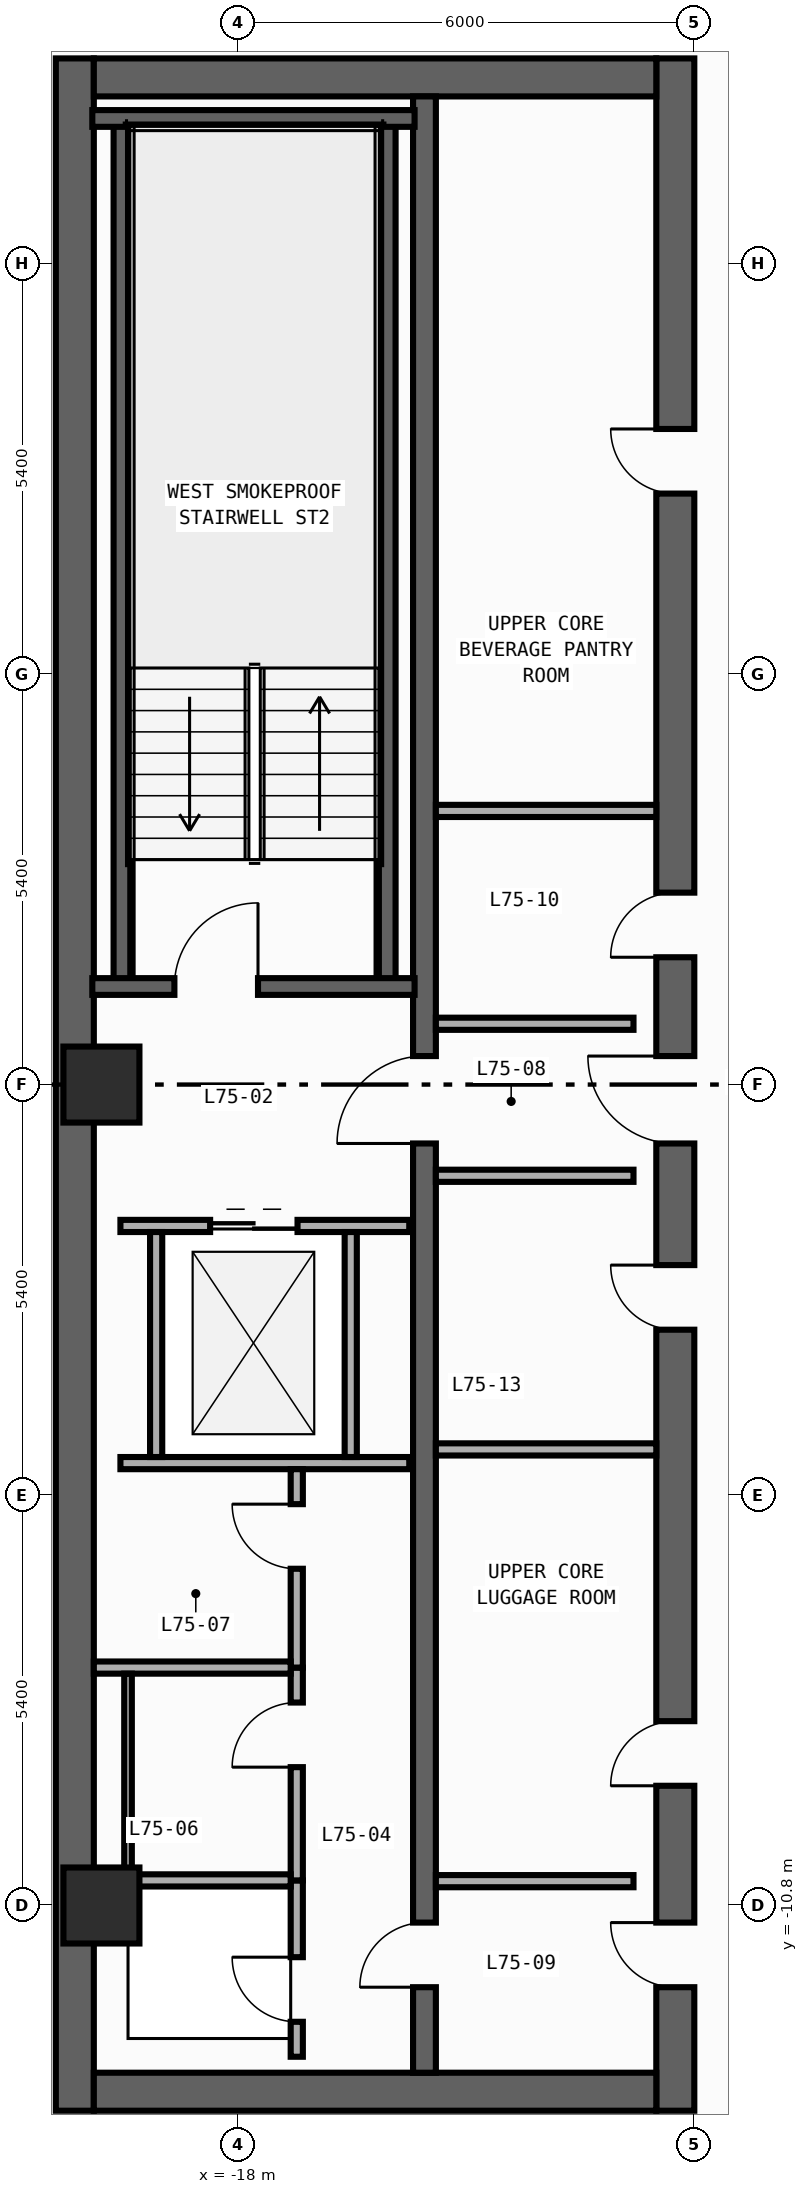
"""IFC4 building model, lengths in metres.
Left out: names, types, materials, properties, quantities, classifications, styles, units other than length and angle.
Written with IfcOpenShell. Run it as: python <this file> out.ifc"""

import sys

from ifc_helpers import new_model, si_unit, direction, frame, frame_2d, origin, origin_2d, place, context, subcontext, project, spatial, rectangle, circle, extrude, element, fill, save


model = new_model("IFC4")
c1 = context("Model", 3, precision=1e-05, world=origin(), true_north=direction((0.0, 1.0)))
c2 = subcontext(c1, "Body", "Model", "MODEL_VIEW")
j1 = project(units=[si_unit("LENGTHUNIT", "METRE"), si_unit("PLANEANGLEUNIT", "RADIAN")], contexts=[c1])
p1 = place(None, origin())
s1 = spatial("IfcSite", under=j1, at=p1, CompositionType="ELEMENT")
p2 = place(p1, origin())
s2 = spatial("IfcBuilding", under=s1, at=p2, CompositionType="ELEMENT")
p3 = place(p2, frame((0.0, 0.0, 311.8)))
s3 = spatial("IfcBuildingStorey", under=s2, at=p3, CompositionType="ELEMENT", Elevation=311.8)
p4 = place(p3, frame((-20.15, -13.5, 0.0), z_axis=(0.0, 0.0, 1.0), x_axis=(0.0, 1.0, 0.0)))
e1 = element("IfcWall", 1, at=p4, inside=s3, PredefinedType="SHEAR", context=c2, shape_type="SweptSolid", body=[
    extrude(rectangle(XDim=27.0, YDim=0.5, at=frame_2d((13.5, 0.0))), origin(), (0.0, 0.0, 1.0), 3.54),
])
p5 = place(p3, frame((-12.25, -13.5, 0.0), z_axis=(0.0, 0.0, 1.0), x_axis=(0.0, 1.0, 0.0)))
e2 = element("IfcWall", 2, at=p5, inside=s3, PredefinedType="SHEAR", context=c2, shape_type="SweptSolid", body=[
    extrude(rectangle(XDim=27.0, YDim=0.5, at=frame_2d((13.5, 0.0))), origin(), (0.0, 0.0, 1.0), 3.54),
])
p6 = place(p5, frame((15.175, 0.0, 0.0)))
e3 = element("IfcOpeningElement", 3, at=p6, cuts=e2, PredefinedType="OPENING", context=c2, shape_type="SweptSolid", body=[
    extrude(rectangle(XDim=0.85, YDim=2.1, at=frame_2d((0.425, 1.05))), frame((0.0, 0.26, 0.0), z_axis=(0.0, -1.0, 0.0), x_axis=(1.0, 0.0, 0.0)), (0.0, 0.0, 1.0), 0.52),
])
p7 = place(p5, frame((21.275, 0.0, 0.0)))
e4 = element("IfcOpeningElement", 4, at=p7, cuts=e2, PredefinedType="OPENING", context=c2, shape_type="SweptSolid", body=[
    extrude(rectangle(XDim=0.85, YDim=2.1, at=frame_2d((0.425, 1.05))), frame((0.0, 0.26, 0.0), z_axis=(0.0, -1.0, 0.0), x_axis=(1.0, 0.0, 0.0)), (0.0, 0.0, 1.0), 0.52),
])
p8 = place(p5, frame((4.275, 0.0, 0.0)))
e5 = element("IfcOpeningElement", 5, at=p8, cuts=e2, PredefinedType="OPENING", context=c2, shape_type="SweptSolid", body=[
    extrude(rectangle(XDim=0.85, YDim=2.1, at=frame_2d((0.425, 1.05))), frame((0.0, 0.26, 0.0), z_axis=(0.0, -1.0, 0.0), x_axis=(1.0, 0.0, 0.0)), (0.0, 0.0, 1.0), 0.52),
])
p9 = place(p5, frame((10.275, 0.0, 0.0)))
e6 = element("IfcOpeningElement", 6, at=p9, cuts=e2, PredefinedType="OPENING", context=c2, shape_type="SweptSolid", body=[
    extrude(rectangle(XDim=0.85, YDim=2.1, at=frame_2d((0.425, 1.05))), frame((0.0, 0.26, 0.0), z_axis=(0.0, -1.0, 0.0), x_axis=(1.0, 0.0, 0.0)), (0.0, 0.0, 1.0), 0.52),
])
p10 = place(p5, frame((12.725, 0.0, 0.0)))
e7 = element("IfcOpeningElement", 7, at=p10, cuts=e2, PredefinedType="OPENING", context=c2, shape_type="SweptSolid", body=[
    extrude(rectangle(XDim=1.15, YDim=2.2, at=frame_2d((0.575, 1.1))), frame((0.0, 0.26, 0.0), z_axis=(0.0, -1.0, 0.0), x_axis=(1.0, 0.0, 0.0)), (0.0, 0.0, 1.0), 0.52),
])
p11 = place(p5, frame((1.625, 0.0, 0.0)))
e8 = element("IfcOpeningElement", 8, at=p11, cuts=e2, PredefinedType="OPENING", context=c2, shape_type="SweptSolid", body=[
    extrude(rectangle(XDim=0.85, YDim=2.1, at=frame_2d((0.425, 1.05))), frame((0.0, 0.26, 0.0), z_axis=(0.0, -1.0, 0.0), x_axis=(1.0, 0.0, 0.0)), (0.0, 0.0, 1.0), 0.52),
])
for number, where, z_axis, x_axis in (
    (9, (-19.9, -13.25, 0.0), (0.0, 0.0, 1.0), (1.0, 0.0, 0.0)),
    (10, (-19.9, 13.25, 0.0), (0.0, 0.0, 1.0), (1.0, 0.0, 0.0)),
):
    element("IfcWall", number, at=place(p3, frame(where, z_axis=z_axis, x_axis=x_axis)), inside=s3, PredefinedType="SHEAR", context=c2, shape_type="SweptSolid", body=[
        extrude(rectangle(XDim=7.4, YDim=0.5, at=frame_2d((3.7, 0.0))), origin(), (0.0, 0.0, 1.0), 3.54),
    ])
p12 = place(p3, frame((-15.55, -13.0, 0.0), z_axis=(0.0, 0.0, 1.0), x_axis=(0.0, 1.0, 0.0)))
e11 = element("IfcWall", 11, at=p12, inside=s3, PredefinedType="SHEAR", context=c2, shape_type="SweptSolid", body=[
    extrude(rectangle(XDim=26.0, YDim=0.3, at=frame_2d((13.0, 0.0))), origin(), (0.0, 0.0, 1.0), 3.54),
])
p13 = place(p12, frame((12.225, 0.0, 0.0)))
e12 = element("IfcOpeningElement", 12, at=p13, cuts=e11, PredefinedType="OPENING", context=c2, shape_type="SweptSolid", body=[
    extrude(rectangle(XDim=1.15, YDim=2.2, at=frame_2d((0.575, 1.1))), frame((0.0, 0.16, 0.0), z_axis=(0.0, -1.0, 0.0), x_axis=(1.0, 0.0, 0.0)), (0.0, 0.0, 1.0), 0.32),
])
p14 = place(p12, frame((1.125, 0.0, 0.0)))
e13 = element("IfcOpeningElement", 13, at=p14, cuts=e11, PredefinedType="OPENING", context=c2, shape_type="SweptSolid", body=[
    extrude(rectangle(XDim=0.85, YDim=2.1, at=frame_2d((0.425, 1.05))), frame((0.0, 0.16, 0.0), z_axis=(0.0, -1.0, 0.0), x_axis=(1.0, 0.0, 0.0)), (0.0, 0.0, 1.0), 0.32),
])
for number, where, z_axis, x_axis in (
    (14, (-16.04, 1.29, 0.0), (0.0, 0.0, 1.0), (0.0, 1.0, 0.0)),
    (15, (-19.53, 1.29, 0.0), (0.0, 0.0, 1.0), (0.0, 1.0, 0.0)),
):
    element("IfcWall", number, at=place(p3, frame(where, z_axis=z_axis, x_axis=x_axis)), inside=s3, PredefinedType="SHEAR", context=c2, shape_type="SweptSolid", body=[
        extrude(rectangle(XDim=11.42, YDim=0.22, at=frame_2d((5.71, 0.0))), origin(), (0.0, 0.0, 1.0), 3.54),
    ])
p15 = place(p3, frame((-19.92, 12.71, 0.0), z_axis=(0.0, 0.0, 1.0), x_axis=(1.0, 0.0, 0.0)))
e16 = element("IfcWall", 16, at=p15, inside=s3, PredefinedType="SHEAR", context=c2, shape_type="SweptSolid", body=[
    extrude(rectangle(XDim=4.24, YDim=0.22, at=frame_2d((2.12, 0.0))), origin(), (0.0, 0.0, 1.0), 3.54),
])
p16 = place(p3, frame((-19.92, 1.29, 0.0), z_axis=(0.0, 0.0, 1.0), x_axis=(1.0, 0.0, 0.0)))
e17 = element("IfcWall", 17, at=p16, inside=s3, PredefinedType="SHEAR", context=c2, shape_type="SweptSolid", body=[
    extrude(rectangle(XDim=4.24, YDim=0.22, at=frame_2d((2.12, 0.0))), origin(), (0.0, 0.0, 1.0), 3.54),
])
p17 = place(p16, frame((1.08, 0.0, 0.0)))
e18 = element("IfcOpeningElement", 18, at=p17, cuts=e17, PredefinedType="OPENING", context=c2, shape_type="SweptSolid", body=[
    extrude(rectangle(XDim=1.1, YDim=2.2, at=frame_2d((0.55, 1.1))), frame((0.0, 0.12, 0.0), z_axis=(0.0, -1.0, 0.0), x_axis=(1.0, 0.0, 0.0)), (0.0, 0.0, 1.0), 0.24),
])
for number, where, z_axis, x_axis in (
    (19, (-19.8, -10.8, 0.0), (0.0, 0.0, 1.0), (1.0, 0.0, 0.0)),
    (20, (-19.8, 0.0, 0.0), (0.0, 0.0, 1.0), (1.0, 0.0, 0.0)),
):
    element("IfcColumn", number, at=place(p3, frame(where, z_axis=z_axis, x_axis=x_axis)), inside=s3, PredefinedType="COLUMN", context=c2, shape_type="SweptSolid", body=[
        extrude(circle(Radius=0.5, at=origin_2d()), origin(), (0.0, 0.0, 1.0), 3.8),
    ])
p18 = place(p3, frame((-19.55, -1.86, 0.0), z_axis=(0.0, 0.0, 1.0), x_axis=(1.0, 0.0, 0.0)))
e21 = element("IfcWall", 21, at=p18, inside=s3, PredefinedType="STANDARD", context=c2, shape_type="SweptSolid", body=[
    extrude(rectangle(XDim=3.8, YDim=0.16, at=frame_2d((1.9, 0.0))), origin(), (0.0, 0.0, 1.0), 3.54),
])
p19 = place(p18, frame((1.18, 0.0, 0.0)))
e22 = element("IfcOpeningElement", 22, at=p19, cuts=e21, PredefinedType="OPENING", context=c2, shape_type="SweptSolid", body=[
    extrude(rectangle(XDim=1.15, YDim=2.2, at=frame_2d((0.575, 1.1))), frame((0.0, 0.09, 0.0), z_axis=(0.0, -1.0, 0.0), x_axis=(1.0, 0.0, 0.0)), (0.0, 0.0, 1.0), 0.18),
])
p20 = place(p3, frame((-19.55, -4.98, 0.0), z_axis=(0.0, 0.0, 1.0), x_axis=(1.0, 0.0, 0.0)))
e23 = element("IfcWall", 23, at=p20, inside=s3, PredefinedType="STANDARD", context=c2, shape_type="SweptSolid", body=[
    extrude(rectangle(XDim=3.8, YDim=0.16, at=frame_2d((1.9, 0.0))), origin(), (0.0, 0.0, 1.0), 3.54),
])
for number, where, z_axis, x_axis in (
    (24, (-19.08, -4.9, 0.0), (0.0, 0.0, 1.0), (0.0, 1.0, 0.0)),
    (25, (-16.52, -4.9, 0.0), (0.0, 0.0, 1.0), (0.0, 1.0, 0.0)),
):
    element("IfcWall", number, at=place(p3, frame(where, z_axis=z_axis, x_axis=x_axis)), inside=s3, PredefinedType="STANDARD", context=c2, shape_type="SweptSolid", body=[
        extrude(rectangle(XDim=2.96, YDim=0.16, at=frame_2d((1.48, 0.0))), origin(), (0.0, 0.0, 1.0), 3.54),
    ])
for number, where, z_axis, x_axis in (
    (26, (-15.4, 0.8, 0.0), (0.0, 0.0, 1.0), (1.0, 0.0, 0.0)),
    (27, (-15.4, -1.2, 0.0), (0.0, 0.0, 1.0), (1.0, 0.0, 0.0)),
    (28, (-15.4, -10.48, 0.0), (0.0, 0.0, 1.0), (1.0, 0.0, 0.0)),
):
    element("IfcWall", number, at=place(p3, frame(where, z_axis=z_axis, x_axis=x_axis)), inside=s3, PredefinedType="STANDARD", context=c2, shape_type="SweptSolid", body=[
        extrude(rectangle(XDim=2.6, YDim=0.16, at=frame_2d((1.3, 0.0))), origin(), (0.0, 0.0, 1.0), 3.54),
    ])
p21 = place(p3, frame((-17.23, -12.79, 0.0), z_axis=(0.0, 0.0, 1.0), x_axis=(0.0, 1.0, 0.0)))
e29 = element("IfcWall", 29, at=p21, inside=s3, PredefinedType="PARTITIONING", context=c2, shape_type="SweptSolid", body=[
    extrude(rectangle(XDim=2.32, YDim=0.16, at=frame_2d((1.16, 0.0))), origin(), (0.0, 0.0, 1.0), 3.54),
])
p22 = place(p21, frame((0.46, 0.0, 0.0)))
e30 = element("IfcOpeningElement", 30, at=p22, cuts=e29, PredefinedType="OPENING", context=c2, shape_type="SweptSolid", body=[
    extrude(rectangle(XDim=0.85, YDim=2.1, at=frame_2d((0.425, 1.05))), frame((0.0, 0.09, 0.0), z_axis=(0.0, -1.0, 0.0), x_axis=(1.0, 0.0, 0.0)), (0.0, 0.0, 1.0), 0.18),
])
p23 = place(p3, frame((-17.23, -10.47, 0.0), z_axis=(0.0, 0.0, 1.0), x_axis=(0.0, 1.0, 0.0)))
e31 = element("IfcWall", 31, at=p23, inside=s3, PredefinedType="PARTITIONING", context=c2, shape_type="SweptSolid", body=[
    extrude(rectangle(XDim=2.8, YDim=0.16, at=frame_2d((1.4, 0.0))), origin(), (0.0, 0.0, 1.0), 3.54),
])
p24 = place(p23, frame((1.49, 0.0, 0.0)))
e32 = element("IfcOpeningElement", 32, at=p24, cuts=e31, PredefinedType="OPENING", context=c2, shape_type="SweptSolid", body=[
    extrude(rectangle(XDim=0.85, YDim=2.1, at=frame_2d((0.425, 1.05))), frame((0.0, 0.09, 0.0), z_axis=(0.0, -1.0, 0.0), x_axis=(1.0, 0.0, 0.0)), (0.0, 0.0, 1.0), 0.18),
])
p25 = place(p3, frame((-17.23, -7.67, 0.0), z_axis=(0.0, 0.0, 1.0), x_axis=(0.0, 1.0, 0.0)))
e33 = element("IfcWall", 33, at=p25, inside=s3, PredefinedType="PARTITIONING", context=c2, shape_type="SweptSolid", body=[
    extrude(rectangle(XDim=2.61, YDim=0.16, at=frame_2d((1.305, 0.0))), origin(), (0.0, 0.0, 1.0), 3.54),
])
p26 = place(p25, frame((1.3, 0.0, 0.0)))
e34 = element("IfcOpeningElement", 34, at=p26, cuts=e33, PredefinedType="OPENING", context=c2, shape_type="SweptSolid", body=[
    extrude(rectangle(XDim=0.85, YDim=2.1, at=frame_2d((0.425, 1.05))), frame((0.0, 0.09, 0.0), z_axis=(0.0, -1.0, 0.0), x_axis=(1.0, 0.0, 0.0)), (0.0, 0.0, 1.0), 0.18),
])
p27 = place(p3, frame((-19.75, -10.47, 0.0), z_axis=(0.0, 0.0, 1.0), x_axis=(1.0, 0.0, 0.0)))
e35 = element("IfcWall", 35, at=p27, inside=s3, PredefinedType="PARTITIONING", context=c2, shape_type="SweptSolid", body=[
    extrude(rectangle(XDim=2.44, YDim=0.16, at=frame_2d((1.22, 0.0))), origin(), (0.0, 0.0, 1.0), 3.54),
])
p28 = place(p3, frame((-19.9, -7.67, 0.0), z_axis=(0.0, 0.0, 1.0), x_axis=(1.0, 0.0, 0.0)))
e36 = element("IfcWall", 36, at=p28, inside=s3, PredefinedType="PARTITIONING", context=c2, shape_type="SweptSolid", body=[
    extrude(rectangle(XDim=2.59, YDim=0.16, at=frame_2d((1.295, 0.0))), origin(), (0.0, 0.0, 1.0), 3.54),
])
for number, where, z_axis, x_axis in (
    (37, (-15.4, 3.6, 0.0), (0.0, 0.0, 1.0), (1.0, 0.0, 0.0)),
    (38, (-15.4, -4.8, 0.0), (0.0, 0.0, 1.0), (1.0, 0.0, 0.0)),
):
    element("IfcWall", number, at=place(p3, frame(where, z_axis=z_axis, x_axis=x_axis)), inside=s3, PredefinedType="PARTITIONING", context=c2, shape_type="SweptSolid", body=[
        extrude(rectangle(XDim=2.9, YDim=0.16, at=frame_2d((1.45, 0.0))), origin(), (0.0, 0.0, 1.0), 3.54),
    ])
p29 = place(p3, frame((-19.45, -10.39, 0.0), z_axis=(0.0, 0.0, 1.0), x_axis=(0.0, 1.0, 0.0)))
e39 = element("IfcWall", 39, at=p29, inside=s3, PredefinedType="PARTITIONING", context=c2, shape_type="SweptSolid", body=[
    extrude(rectangle(XDim=2.64, YDim=0.1, at=frame_2d((1.32, 0.0))), origin(), (0.0, 0.0, 1.0), 3.54),
])
p30 = place(p17, origin())
e40 = element("IfcDoor", 40, at=p30, inside=s3, OperationType="SINGLE_SWING_RIGHT", PredefinedType="DOOR", context=c2, shape_type="SweptSolid", body=[
    extrude(rectangle(XDim=1.1, YDim=2.2, at=frame_2d((0.55, 1.1))), frame((0.0, 0.025, 0.0), z_axis=(0.0, -1.0, 0.0), x_axis=(1.0, 0.0, 0.0)), (0.0, 0.0, 1.0), 0.05),
])
fill(e18, e40)
p31 = place(p6, origin())
e41 = element("IfcDoor", 41, at=p31, inside=s3, OperationType="SINGLE_SWING_LEFT", PredefinedType="DOOR", context=c2, shape_type="SweptSolid", body=[
    extrude(rectangle(XDim=0.85, YDim=2.1, at=frame_2d((0.425, 1.05))), frame((0.0, 0.025, 0.0), z_axis=(0.0, -1.0, 0.0), x_axis=(1.0, 0.0, 0.0)), (0.0, 0.0, 1.0), 0.05),
])
fill(e3, e41)
p32 = place(p7, origin())
e42 = element("IfcDoor", 42, at=p32, inside=s3, OperationType="SINGLE_SWING_RIGHT", PredefinedType="DOOR", context=c2, shape_type="SweptSolid", body=[
    extrude(rectangle(XDim=0.85, YDim=2.1, at=frame_2d((0.425, 1.05))), frame((0.0, 0.025, 0.0), z_axis=(0.0, -1.0, 0.0), x_axis=(1.0, 0.0, 0.0)), (0.0, 0.0, 1.0), 0.05),
])
fill(e4, e42)
p33 = place(p8, origin())
e43 = element("IfcDoor", 43, at=p33, inside=s3, OperationType="SINGLE_SWING_LEFT", PredefinedType="DOOR", context=c2, shape_type="SweptSolid", body=[
    extrude(rectangle(XDim=0.85, YDim=2.1, at=frame_2d((0.425, 1.05))), frame((0.0, 0.025, 0.0), z_axis=(0.0, -1.0, 0.0), x_axis=(1.0, 0.0, 0.0)), (0.0, 0.0, 1.0), 0.05),
])
fill(e5, e43)
p34 = place(p9, origin())
e44 = element("IfcDoor", 44, at=p34, inside=s3, OperationType="SINGLE_SWING_RIGHT", PredefinedType="DOOR", context=c2, shape_type="SweptSolid", body=[
    extrude(rectangle(XDim=0.85, YDim=2.1, at=frame_2d((0.425, 1.05))), frame((0.0, 0.025, 0.0), z_axis=(0.0, -1.0, 0.0), x_axis=(1.0, 0.0, 0.0)), (0.0, 0.0, 1.0), 0.05),
])
fill(e6, e44)
p35 = place(p10, origin())
e45 = element("IfcDoor", 45, at=p35, inside=s3, OperationType="SINGLE_SWING_RIGHT", PredefinedType="DOOR", context=c2, shape_type="SweptSolid", body=[
    extrude(rectangle(XDim=1.15, YDim=2.2, at=frame_2d((0.575, 1.1))), frame((0.0, 0.025, 0.0), z_axis=(0.0, -1.0, 0.0), x_axis=(1.0, 0.0, 0.0)), (0.0, 0.0, 1.0), 0.05),
])
fill(e7, e45)
p36 = place(p13, origin())
e46 = element("IfcDoor", 46, at=p36, inside=s3, OperationType="SINGLE_SWING_LEFT", PredefinedType="DOOR", context=c2, shape_type="SweptSolid", body=[
    extrude(rectangle(XDim=1.15, YDim=2.2, at=frame_2d((0.575, 1.1))), frame((0.0, 0.025, 0.0), z_axis=(0.0, -1.0, 0.0), x_axis=(1.0, 0.0, 0.0)), (0.0, 0.0, 1.0), 0.05),
])
fill(e12, e46)
p37 = place(p11, origin())
e47 = element("IfcDoor", 47, at=p37, inside=s3, OperationType="SINGLE_SWING_RIGHT", PredefinedType="DOOR", context=c2, shape_type="SweptSolid", body=[
    extrude(rectangle(XDim=0.85, YDim=2.1, at=frame_2d((0.425, 1.05))), frame((0.0, 0.025, 0.0), z_axis=(0.0, -1.0, 0.0), x_axis=(1.0, 0.0, 0.0)), (0.0, 0.0, 1.0), 0.05),
])
fill(e8, e47)
p38 = place(p14, origin())
e48 = element("IfcDoor", 48, at=p38, inside=s3, OperationType="SINGLE_SWING_LEFT", PredefinedType="DOOR", context=c2, shape_type="SweptSolid", body=[
    extrude(rectangle(XDim=0.85, YDim=2.1, at=frame_2d((0.425, 1.05))), frame((0.0, 0.025, 0.0), z_axis=(0.0, -1.0, 0.0), x_axis=(1.0, 0.0, 0.0)), (0.0, 0.0, 1.0), 0.05),
])
fill(e13, e48)
p39 = place(p19, origin())
e49 = element("IfcDoor", 49, at=p39, inside=s3, OperationType="DOUBLE_DOOR_SLIDING", PredefinedType="DOOR", context=c2, shape_type="SweptSolid", body=[
    extrude(rectangle(XDim=1.15, YDim=2.2, at=frame_2d((0.575, 1.1))), frame((0.0, 0.025, 0.0), z_axis=(0.0, -1.0, 0.0), x_axis=(1.0, 0.0, 0.0)), (0.0, 0.0, 1.0), 0.05),
])
fill(e22, e49)
p40 = place(p22, origin())
e50 = element("IfcDoor", 50, at=p40, inside=s3, OperationType="SINGLE_SWING_RIGHT", PredefinedType="DOOR", context=c2, shape_type="SweptSolid", body=[
    extrude(rectangle(XDim=0.85, YDim=2.1, at=frame_2d((0.425, 1.05))), frame((0.0, 0.025, 0.0), z_axis=(0.0, -1.0, 0.0), x_axis=(1.0, 0.0, 0.0)), (0.0, 0.0, 1.0), 0.05),
])
fill(e30, e50)
p41 = place(p24, origin())
e51 = element("IfcDoor", 51, at=p41, inside=s3, OperationType="SINGLE_SWING_LEFT", PredefinedType="DOOR", context=c2, shape_type="SweptSolid", body=[
    extrude(rectangle(XDim=0.85, YDim=2.1, at=frame_2d((0.425, 1.05))), frame((0.0, 0.025, 0.0), z_axis=(0.0, -1.0, 0.0), x_axis=(1.0, 0.0, 0.0)), (0.0, 0.0, 1.0), 0.05),
])
fill(e32, e51)
p42 = place(p26, origin())
e52 = element("IfcDoor", 52, at=p42, inside=s3, OperationType="SINGLE_SWING_RIGHT", PredefinedType="DOOR", context=c2, shape_type="SweptSolid", body=[
    extrude(rectangle(XDim=0.85, YDim=2.1, at=frame_2d((0.425, 1.05))), frame((0.0, 0.025, 0.0), z_axis=(0.0, -1.0, 0.0), x_axis=(1.0, 0.0, 0.0)), (0.0, 0.0, 1.0), 0.05),
])
fill(e34, e52)
save(model, sys.argv[1])
